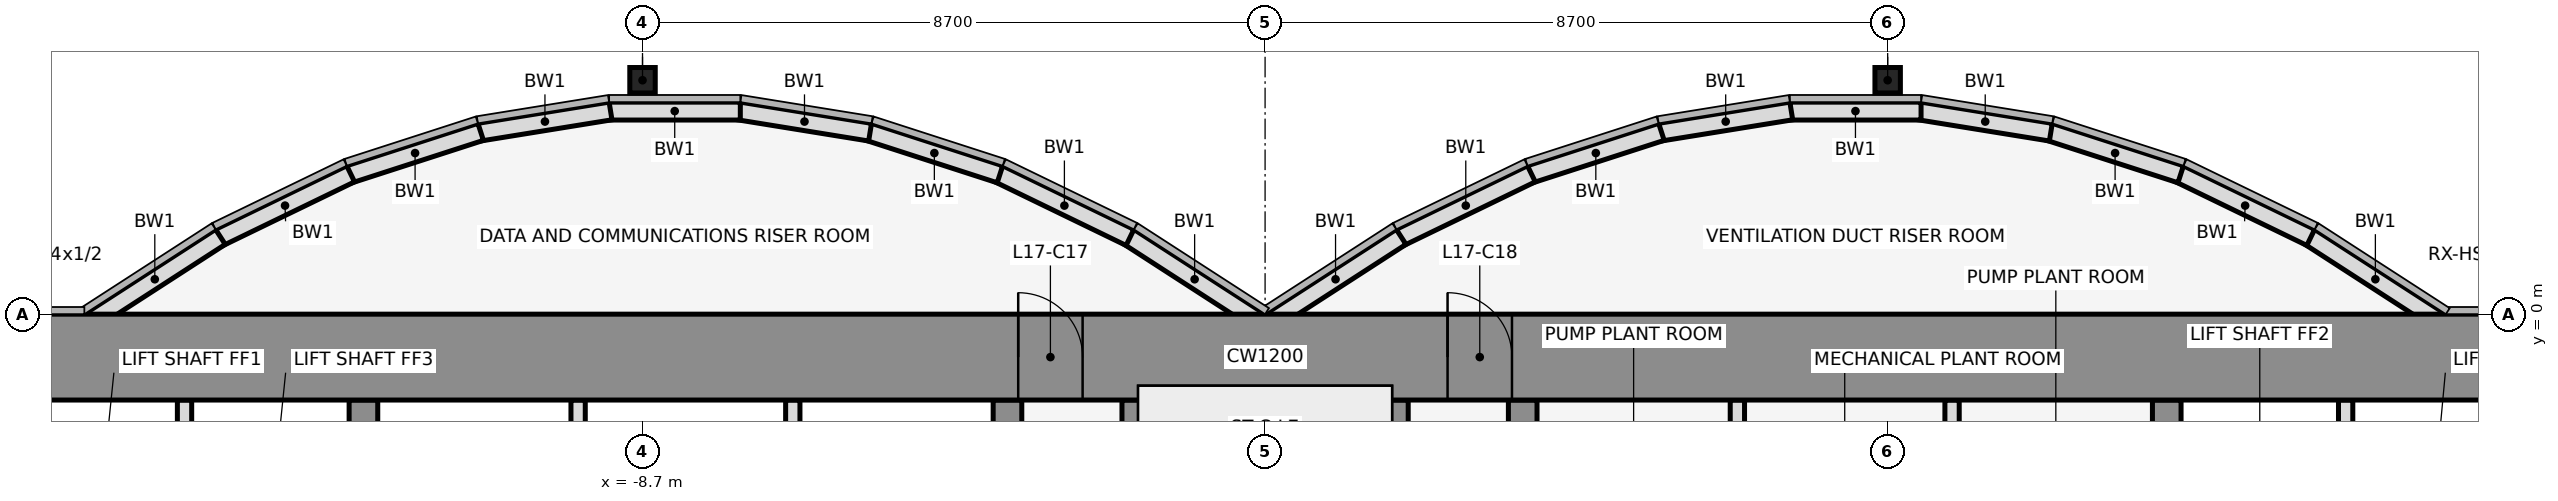
"""IFC4 building model, lengths in metres.
Left out: names, types, materials, properties, quantities, classifications, styles, units other than length and angle.
Written with IfcOpenShell. Run it as: python <this file> out.ifc"""

import sys

from ifc_helpers import new_model, si_unit, direction, frame, frame_2d, origin, origin_2d, place, context, subcontext, project, spatial, rectangle, hollow_rectangle, extrude, element, fill, save


model = new_model("IFC4")
c1 = context("Model", 3, precision=1e-05, world=origin(), true_north=direction((0.0, 1.0)))
c2 = subcontext(c1, "Body", "Model", "MODEL_VIEW")
j1 = project(units=[si_unit("LENGTHUNIT", "METRE"), si_unit("PLANEANGLEUNIT", "RADIAN")], contexts=[c1])
p1 = place(None, origin())
s1 = spatial("IfcSite", under=j1, at=p1, CompositionType="ELEMENT")
p2 = place(p1, origin())
s2 = spatial("IfcBuilding", under=s1, at=p2, CompositionType="ELEMENT")
p3 = place(p2, frame((0.0, 0.0, 84.5)))
s3 = spatial("IfcBuildingStorey", under=s2, at=p3, CompositionType="ELEMENT", Elevation=84.5)
for number, where, z_axis, x_axis in (
    (1, (-8.7, 3.269, 0.0), (0.0, 0.0, 1.0), (1.0, 0.0, 0.0)),
    (2, (8.7, 3.269, 0.0), (0.0, 0.0, 1.0), (1.0, 0.0, 0.0)),
):
    element("IfcColumn", number, at=place(p3, frame(where, z_axis=z_axis, x_axis=x_axis)), inside=s3, PredefinedType="COLUMN", context=c2, shape_type="SweptSolid", body=[
        extrude(hollow_rectangle(XDim=0.356, YDim=0.356, WallThickness=0.012, at=origin_2d()), origin(), (0.0, 0.0, 1.0), 5.4),
    ])
p4 = place(p3, frame((16.432, -0.105, 0.0), z_axis=(0.0, 0.0, 1.0), x_axis=(-0.83981312244, 0.542875602121, 0.0)))
e3 = element("IfcWall", 3, at=p4, inside=s3, PredefinedType="STANDARD", context=c2, shape_type="SweptSolid", body=[
    extrude(rectangle(XDim=2.183, YDim=0.25, at=frame_2d((1.091, 0.0))), origin(), (0.0, 0.0, 1.0), 5.25),
])
p5 = place(p3, frame((14.612, 1.073, 0.0), z_axis=(0.0, 0.0, 1.0), x_axis=(-0.89982408427, 0.436252928206, 0.0)))
e4 = element("IfcWall", 4, at=p5, inside=s3, PredefinedType="STANDARD", context=c2, shape_type="SweptSolid", body=[
    extrude(rectangle(XDim=2.038, YDim=0.25, at=frame_2d((1.019, 0.0))), origin(), (0.0, 0.0, 1.0), 5.25),
])
p6 = place(p3, frame((12.795, 1.955, 0.0), z_axis=(0.0, 0.0, 1.0), x_axis=(-0.951495806175, 0.307661714928, 0.0)))
e5 = element("IfcWall", 5, at=p6, inside=s3, PredefinedType="STANDARD", context=c2, shape_type="SweptSolid", body=[
    extrude(rectangle(XDim=1.927, YDim=0.25, at=frame_2d((0.963, 0.0))), origin(), (0.0, 0.0, 1.0), 5.25),
])
p7 = place(p3, frame((10.98, 2.543, 0.0), z_axis=(0.0, 0.0, 1.0), x_axis=(-0.987181718931, 0.159600293885, 0.0)))
e6 = element("IfcWall", 6, at=p7, inside=s3, PredefinedType="STANDARD", context=c2, shape_type="SweptSolid", body=[
    extrude(rectangle(XDim=1.857, YDim=0.25, at=frame_2d((0.929, 0.0))), origin(), (0.0, 0.0, 1.0), 5.25),
])
p8 = place(p3, frame((9.167, 2.838, 0.0), z_axis=(0.0, 0.0, 1.0), x_axis=(-1.0, 0.0, 0.0)))
e7 = element("IfcWall", 7, at=p8, inside=s3, PredefinedType="STANDARD", context=c2, shape_type="SweptSolid", body=[
    extrude(rectangle(XDim=1.833, YDim=0.25, at=frame_2d((0.917, 0.0))), origin(), (0.0, 0.0, 1.0), 5.25),
])
p9 = place(p3, frame((7.353, 2.84, 0.0), z_axis=(0.0, 0.0, 1.0), x_axis=(-0.987181718931, -0.159600293885, 0.0)))
e8 = element("IfcWall", 8, at=p9, inside=s3, PredefinedType="STANDARD", context=c2, shape_type="SweptSolid", body=[
    extrude(rectangle(XDim=1.857, YDim=0.25, at=frame_2d((0.929, 0.0))), origin(), (0.0, 0.0, 1.0), 5.25),
])
p10 = place(p3, frame((5.538, 2.548, 0.0), z_axis=(0.0, 0.0, 1.0), x_axis=(-0.951495806175, -0.307661714928, 0.0)))
e9 = element("IfcWall", 9, at=p10, inside=s3, PredefinedType="STANDARD", context=c2, shape_type="SweptSolid", body=[
    extrude(rectangle(XDim=1.927, YDim=0.25, at=frame_2d((0.963, 0.0))), origin(), (0.0, 0.0, 1.0), 5.25),
])
p11 = place(p3, frame((3.721, 1.962, 0.0), z_axis=(0.0, 0.0, 1.0), x_axis=(-0.89982408427, -0.436252928206, 0.0)))
e10 = element("IfcWall", 10, at=p11, inside=s3, PredefinedType="STANDARD", context=c2, shape_type="SweptSolid", body=[
    extrude(rectangle(XDim=2.038, YDim=0.25, at=frame_2d((1.019, 0.0))), origin(), (0.0, 0.0, 1.0), 5.25),
])
for number, where, z_axis, x_axis in (
    (11, (1.901, 1.08, 0.0), (0.0, 0.0, 1.0), (-0.84, -0.543, 0.0)),
    (12, (-0.068, -0.105, 0.0), (0.0, 0.0, 1.0), (-0.84, 0.543, 0.0)),
):
    element("IfcWall", number, at=place(p3, frame(where, z_axis=z_axis, x_axis=x_axis)), inside=s3, PredefinedType="STANDARD", context=c2, shape_type="SweptSolid", body=[
        extrude(rectangle(XDim=2.183, YDim=0.25, at=frame_2d((1.091, 0.0))), origin(), (0.0, 0.0, 1.0), 5.25),
    ])
p12 = place(p3, frame((-1.888, 1.073, 0.0), z_axis=(0.0, 0.0, 1.0), x_axis=(-0.89982408427, 0.436252928206, 0.0)))
e13 = element("IfcWall", 13, at=p12, inside=s3, PredefinedType="STANDARD", context=c2, shape_type="SweptSolid", body=[
    extrude(rectangle(XDim=2.038, YDim=0.25, at=frame_2d((1.019, 0.0))), origin(), (0.0, 0.0, 1.0), 5.25),
])
p13 = place(p3, frame((-3.705, 1.955, 0.0), z_axis=(0.0, 0.0, 1.0), x_axis=(-0.951495806175, 0.307661714928, 0.0)))
e14 = element("IfcWall", 14, at=p13, inside=s3, PredefinedType="STANDARD", context=c2, shape_type="SweptSolid", body=[
    extrude(rectangle(XDim=1.927, YDim=0.25, at=frame_2d((0.963, 0.0))), origin(), (0.0, 0.0, 1.0), 5.25),
])
p14 = place(p3, frame((-5.52, 2.543, 0.0), z_axis=(0.0, 0.0, 1.0), x_axis=(-0.987181718931, 0.159600293885, 0.0)))
e15 = element("IfcWall", 15, at=p14, inside=s3, PredefinedType="STANDARD", context=c2, shape_type="SweptSolid", body=[
    extrude(rectangle(XDim=1.857, YDim=0.25, at=frame_2d((0.929, 0.0))), origin(), (0.0, 0.0, 1.0), 5.25),
])
p15 = place(p3, frame((-7.333, 2.838, 0.0), z_axis=(0.0, 0.0, 1.0), x_axis=(-1.0, 0.0, 0.0)))
e16 = element("IfcWall", 16, at=p15, inside=s3, PredefinedType="STANDARD", context=c2, shape_type="SweptSolid", body=[
    extrude(rectangle(XDim=1.833, YDim=0.25, at=frame_2d((0.917, 0.0))), origin(), (0.0, 0.0, 1.0), 5.25),
])
p16 = place(p3, frame((-9.147, 2.84, 0.0), z_axis=(0.0, 0.0, 1.0), x_axis=(-0.987181718931, -0.159600293885, 0.0)))
e17 = element("IfcWall", 17, at=p16, inside=s3, PredefinedType="STANDARD", context=c2, shape_type="SweptSolid", body=[
    extrude(rectangle(XDim=1.857, YDim=0.25, at=frame_2d((0.929, 0.0))), origin(), (0.0, 0.0, 1.0), 5.25),
])
p17 = place(p3, frame((-10.962, 2.548, 0.0), z_axis=(0.0, 0.0, 1.0), x_axis=(-0.951495806175, -0.307661714928, 0.0)))
e18 = element("IfcWall", 18, at=p17, inside=s3, PredefinedType="STANDARD", context=c2, shape_type="SweptSolid", body=[
    extrude(rectangle(XDim=1.927, YDim=0.25, at=frame_2d((0.963, 0.0))), origin(), (0.0, 0.0, 1.0), 5.25),
])
p18 = place(p3, frame((-12.779, 1.962, 0.0), z_axis=(0.0, 0.0, 1.0), x_axis=(-0.89982408427, -0.436252928206, 0.0)))
e19 = element("IfcWall", 19, at=p18, inside=s3, PredefinedType="STANDARD", context=c2, shape_type="SweptSolid", body=[
    extrude(rectangle(XDim=2.038, YDim=0.25, at=frame_2d((1.019, 0.0))), origin(), (0.0, 0.0, 1.0), 5.25),
])
p19 = place(p3, frame((-14.599, 1.08, 0.0), z_axis=(0.0, 0.0, 1.0), x_axis=(-0.83981312244, -0.542875602121, 0.0)))
e20 = element("IfcWall", 20, at=p19, inside=s3, PredefinedType="STANDARD", context=c2, shape_type="SweptSolid", body=[
    extrude(rectangle(XDim=2.183, YDim=0.25, at=frame_2d((1.091, 0.0))), origin(), (0.0, 0.0, 1.0), 5.25),
])
p20 = place(p3, frame((-15.1, -4.6, 0.0), z_axis=(0.0, 0.0, 1.0), x_axis=(0.0, 1.0, 0.0)))
e21 = element("IfcWall", 21, at=p20, inside=s3, PredefinedType="PARTITIONING", context=c2, shape_type="SweptSolid", body=[
    extrude(rectangle(XDim=3.4, YDim=0.2, at=frame_2d((1.7, 0.0))), origin(), (0.0, 0.0, 1.0), 4.318),
])
p21 = place(p3, frame((-12.6, -11.8, 0.0), z_axis=(0.0, 0.0, 1.0), x_axis=(0.0, 1.0, 0.0)))
e22 = element("IfcWall", 22, at=p21, inside=s3, PredefinedType="SHEAR", context=c2, shape_type="SweptSolid", body=[
    extrude(rectangle(XDim=10.6, YDim=0.4, at=frame_2d((5.3, 0.0))), origin(), (0.0, 0.0, 1.0), 5.4),
])
p22 = place(p21, frame((4.75, 0.0, 0.0)))
e23 = element("IfcOpeningElement", 23, at=p22, cuts=e22, PredefinedType="OPENING", context=c2, shape_type="SweptSolid", body=[
    extrude(rectangle(XDim=1.1, YDim=2.1, at=frame_2d((0.55, 1.05))), frame((0.0, 0.212, 0.0), z_axis=(0.0, -1.0, 0.0), x_axis=(1.0, 0.0, 0.0)), (0.0, 0.0, 1.0), 0.424),
])
for number, where, z_axis, x_axis in (
    (24, (-9.6, -4.6, 0.0), (0.0, 0.0, 1.0), (0.0, 1.0, 0.0)),
    (25, (-6.6, -4.6, 0.0), (0.0, 0.0, 1.0), (0.0, 1.0, 0.0)),
):
    element("IfcWall", number, at=place(p3, frame(where, z_axis=z_axis, x_axis=x_axis)), inside=s3, PredefinedType="PARTITIONING", context=c2, shape_type="SweptSolid", body=[
        extrude(rectangle(XDim=3.4, YDim=0.2, at=frame_2d((1.7, 0.0))), origin(), (0.0, 0.0, 1.0), 4.318),
    ])
p23 = place(p3, frame((-3.6, -11.8, 0.0), z_axis=(0.0, 0.0, 1.0), x_axis=(0.0, 1.0, 0.0)))
e26 = element("IfcWall", 26, at=p23, inside=s3, PredefinedType="SHEAR", context=c2, shape_type="SweptSolid", body=[
    extrude(rectangle(XDim=10.6, YDim=0.4, at=frame_2d((5.3, 0.0))), origin(), (0.0, 0.0, 1.0), 5.4),
])
p24 = place(p23, frame((4.85, 0.0, 0.0)))
e27 = element("IfcOpeningElement", 27, at=p24, cuts=e26, PredefinedType="OPENING", context=c2, shape_type="SweptSolid", body=[
    extrude(rectangle(XDim=0.9, YDim=2.1, at=frame_2d((0.45, 1.05))), frame((0.0, 0.212, 0.0), z_axis=(0.0, -1.0, 0.0), x_axis=(1.0, 0.0, 0.0)), (0.0, 0.0, 1.0), 0.424),
])
for number, where, z_axis, x_axis in (
    (28, (-1.8, -11.8, 0.0), (0.0, 0.0, 1.0), (0.0, 1.0, 0.0)),
    (29, (1.8, -11.8, 0.0), (0.0, 0.0, 1.0), (0.0, 1.0, 0.0)),
):
    element("IfcWall", number, at=place(p3, frame(where, z_axis=z_axis, x_axis=x_axis)), inside=s3, PredefinedType="SHEAR", context=c2, shape_type="SweptSolid", body=[
        extrude(rectangle(XDim=10.6, YDim=0.4, at=frame_2d((5.3, 0.0))), origin(), (0.0, 0.0, 1.0), 5.4),
    ])
p25 = place(p3, frame((3.6, -11.8, 0.0), z_axis=(0.0, 0.0, 1.0), x_axis=(0.0, 1.0, 0.0)))
e30 = element("IfcWall", 30, at=p25, inside=s3, PredefinedType="SHEAR", context=c2, shape_type="SweptSolid", body=[
    extrude(rectangle(XDim=10.6, YDim=0.4, at=frame_2d((5.3, 0.0))), origin(), (0.0, 0.0, 1.0), 5.4),
])
p26 = place(p25, frame((1.35, 0.0, 0.0)))
e31 = element("IfcOpeningElement", 31, at=p26, cuts=e30, PredefinedType="OPENING", context=c2, shape_type="SweptSolid", body=[
    extrude(rectangle(XDim=0.9, YDim=2.1, at=frame_2d((0.45, 1.05))), frame((0.0, 0.212, 0.0), z_axis=(0.0, -1.0, 0.0), x_axis=(1.0, 0.0, 0.0)), (0.0, 0.0, 1.0), 0.424),
])
for number, where, z_axis, x_axis in (
    (32, (6.6, -4.6, 0.0), (0.0, 0.0, 1.0), (0.0, 1.0, 0.0)),
    (33, (9.6, -4.6, 0.0), (0.0, 0.0, 1.0), (0.0, 1.0, 0.0)),
):
    element("IfcWall", number, at=place(p3, frame(where, z_axis=z_axis, x_axis=x_axis)), inside=s3, PredefinedType="PARTITIONING", context=c2, shape_type="SweptSolid", body=[
        extrude(rectangle(XDim=3.4, YDim=0.2, at=frame_2d((1.7, 0.0))), origin(), (0.0, 0.0, 1.0), 4.318),
    ])
p27 = place(p3, frame((12.6, -11.8, 0.0), z_axis=(0.0, 0.0, 1.0), x_axis=(0.0, 1.0, 0.0)))
e34 = element("IfcWall", 34, at=p27, inside=s3, PredefinedType="SHEAR", context=c2, shape_type="SweptSolid", body=[
    extrude(rectangle(XDim=10.6, YDim=0.4, at=frame_2d((5.3, 0.0))), origin(), (0.0, 0.0, 1.0), 5.4),
])
p28 = place(p27, frame((4.75, 0.0, 0.0)))
e35 = element("IfcOpeningElement", 35, at=p28, cuts=e34, PredefinedType="OPENING", context=c2, shape_type="SweptSolid", body=[
    extrude(rectangle(XDim=1.1, YDim=2.1, at=frame_2d((0.55, 1.05))), frame((0.0, 0.212, 0.0), z_axis=(0.0, -1.0, 0.0), x_axis=(1.0, 0.0, 0.0)), (0.0, 0.0, 1.0), 0.424),
])
p29 = place(p3, frame((15.1, -4.6, 0.0), z_axis=(0.0, 0.0, 1.0), x_axis=(0.0, 1.0, 0.0)))
e36 = element("IfcWall", 36, at=p29, inside=s3, PredefinedType="PARTITIONING", context=c2, shape_type="SweptSolid", body=[
    extrude(rectangle(XDim=3.4, YDim=0.2, at=frame_2d((1.7, 0.0))), origin(), (0.0, 0.0, 1.0), 4.318),
])
p30 = place(p3, frame((-22.0, -0.6, 0.0), z_axis=(0.0, 0.0, 1.0), x_axis=(1.0, 0.0, 0.0)))
e37 = element("IfcWall", 37, at=p30, inside=s3, PredefinedType="SHEAR", context=c2, shape_type="SweptSolid", body=[
    extrude(rectangle(XDim=44.0, YDim=1.2, at=frame_2d((22.0, 0.0))), origin(), (0.0, 0.0, 1.0), 5.4),
])
p31 = place(p30, frame((18.55, 0.0, 0.0)))
e38 = element("IfcOpeningElement", 38, at=p31, cuts=e37, PredefinedType="OPENING", context=c2, shape_type="SweptSolid", body=[
    extrude(rectangle(XDim=0.9, YDim=2.1, at=frame_2d((0.45, 1.05))), frame((0.0, 0.612, 0.0), z_axis=(0.0, -1.0, 0.0), x_axis=(1.0, 0.0, 0.0)), (0.0, 0.0, 1.0), 1.224),
])
p32 = place(p30, frame((24.55, 0.0, 0.0)))
e39 = element("IfcOpeningElement", 39, at=p32, cuts=e37, PredefinedType="OPENING", context=c2, shape_type="SweptSolid", body=[
    extrude(rectangle(XDim=0.9, YDim=2.1, at=frame_2d((0.45, 1.05))), frame((0.0, 0.612, 0.0), z_axis=(0.0, -1.0, 0.0), x_axis=(1.0, 0.0, 0.0)), (0.0, 0.0, 1.0), 1.224),
])
p33 = place(p31, origin())
e40 = element("IfcDoor", 40, at=p33, inside=s3, OperationType="SINGLE_SWING_LEFT", PredefinedType="DOOR", context=c2, shape_type="SweptSolid", body=[
    extrude(rectangle(XDim=0.9, YDim=2.1, at=frame_2d((0.45, 1.05))), frame((0.0, 0.025, 0.0), z_axis=(0.0, -1.0, 0.0), x_axis=(1.0, 0.0, 0.0)), (0.0, 0.0, 1.0), 0.05),
])
fill(e38, e40)
p34 = place(p32, origin())
e41 = element("IfcDoor", 41, at=p34, inside=s3, OperationType="SINGLE_SWING_LEFT", PredefinedType="DOOR", context=c2, shape_type="SweptSolid", body=[
    extrude(rectangle(XDim=0.9, YDim=2.1, at=frame_2d((0.45, 1.05))), frame((0.0, 0.025, 0.0), z_axis=(0.0, -1.0, 0.0), x_axis=(1.0, 0.0, 0.0)), (0.0, 0.0, 1.0), 0.05),
])
fill(e39, e41)
save(model, sys.argv[1])
